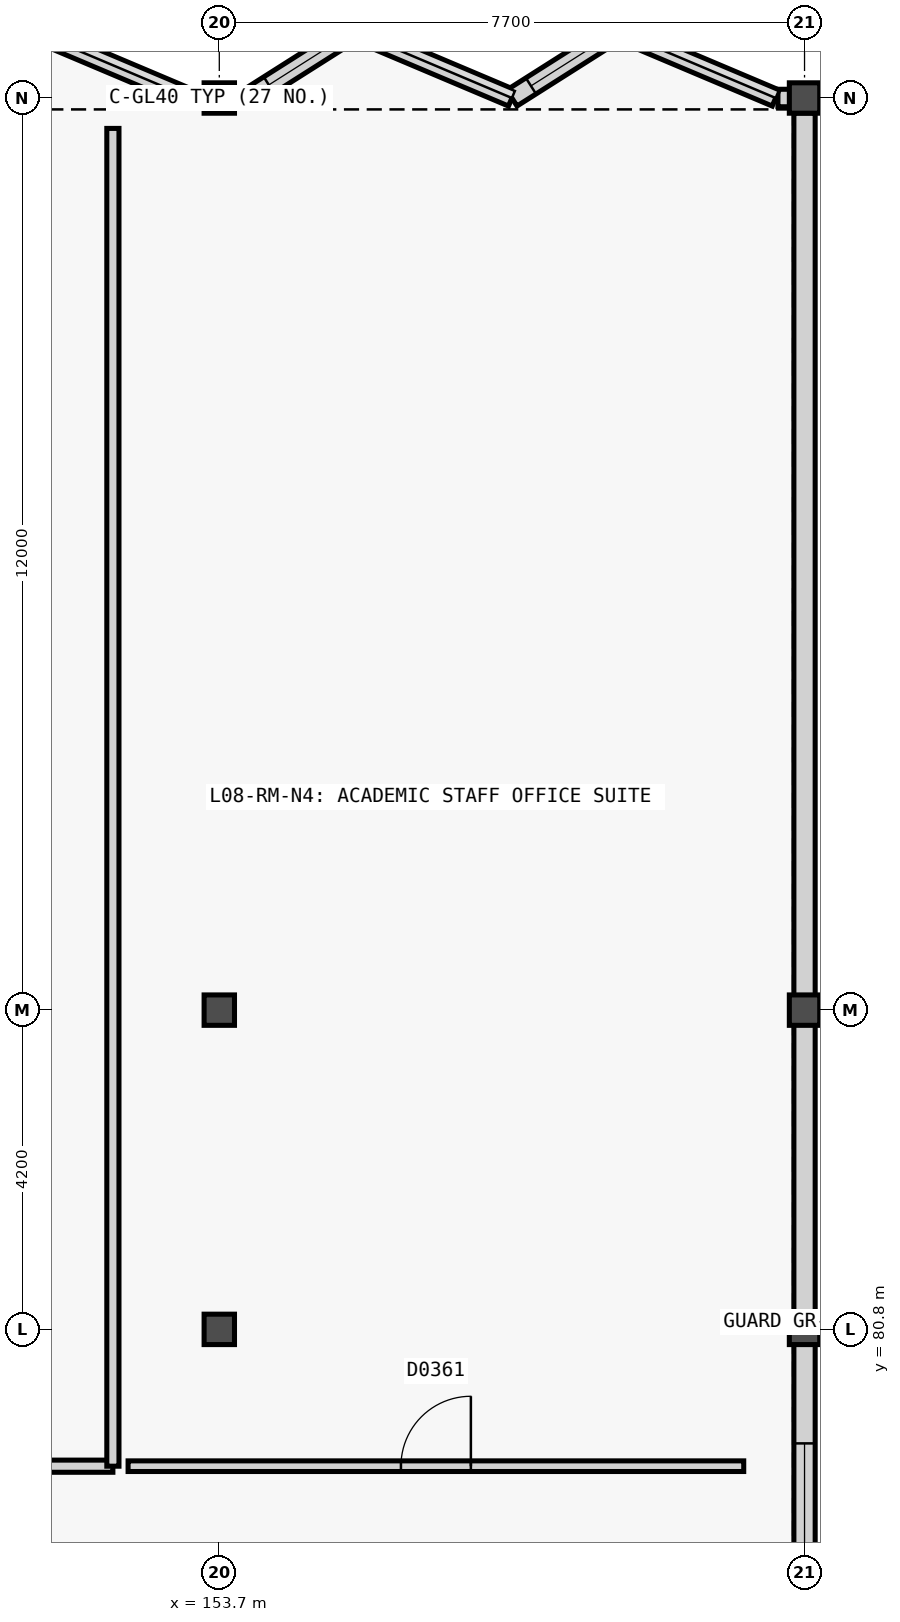
"""IFC4 building model, lengths in metres.
Left out: names, types, materials, properties, quantities, classifications, styles, units other than length and angle.
Written with IfcOpenShell. Run it as: python <this file> out.ifc"""

import sys

from ifc_helpers import new_model, si_unit, direction, frame, frame_2d, origin, origin_2d, place, context, subcontext, project, spatial, rectangle, extrude, element, fill, save


model = new_model("IFC4")
c1 = context("Model", 3, precision=1e-05, world=origin(), true_north=direction((0.0, 1.0)))
c2 = subcontext(c1, "Body", "Model", "MODEL_VIEW")
j1 = project(units=[si_unit("LENGTHUNIT", "METRE"), si_unit("PLANEANGLEUNIT", "RADIAN")], contexts=[c1])
p1 = place(None, origin())
s1 = spatial("IfcSite", under=j1, at=p1, CompositionType="ELEMENT")
p2 = place(p1, origin())
s2 = spatial("IfcBuilding", under=s1, at=p2, CompositionType="ELEMENT")
p3 = place(p2, frame((0.0, 0.0, 32.4)))
s3 = spatial("IfcBuildingStorey", under=s2, at=p3, CompositionType="ELEMENT", Elevation=32.4)
for number, where, z_axis, x_axis in (
    (1, (153.7, 80.8, 0.0), (0.0, 0.0, 1.0), (1.0, 0.0, 0.0)),
    (2, (153.7, 85.0, 0.0), (0.0, 0.0, 1.0), (1.0, 0.0, 0.0)),
    (3, (153.7, 97.0, 0.0), (0.0, 0.0, 1.0), (1.0, 0.0, 0.0)),
    (4, (161.4, 80.8, 0.0), (0.0, 0.0, 1.0), (1.0, 0.0, 0.0)),
    (5, (161.4, 85.0, 0.0), (0.0, 0.0, 1.0), (1.0, 0.0, 0.0)),
    (6, (161.4, 97.0, 0.0), (0.0, 0.0, 1.0), (1.0, 0.0, 0.0)),
):
    element("IfcColumn", number, at=place(p3, frame(where, z_axis=z_axis, x_axis=x_axis)), inside=s3, PredefinedType="COLUMN", context=c2, shape_type="SweptSolid", body=[
        extrude(rectangle(XDim=0.4, YDim=0.4, at=origin_2d()), origin(), (0.0, 0.0, 1.0), 3.6),
    ])
p4 = place(p3, frame((161.4, 96.802, 0.0), z_axis=(0.0, 0.0, 1.0), x_axis=(0.0, -1.0, 0.0)))
e7 = element("IfcWall", 7, at=p4, inside=s3, PredefinedType="SOLIDWALL", context=c2, shape_type="SweptSolid", body=[
    extrude(rectangle(XDim=32.604, YDim=0.28, at=frame_2d((16.302, 0.0))), origin(), (0.0, 0.0, 1.0), 2.8),
])
p5 = place(p4, frame((17.502, 0.0, 0.82)))
e8 = element("IfcOpeningElement", 8, at=p5, cuts=e7, PredefinedType="OPENING", context=c2, shape_type="SweptSolid", body=[
    extrude(rectangle(XDim=4.6, YDim=1.6, at=frame_2d((2.3, 0.8))), frame((0.0, 0.15, 0.0), z_axis=(0.0, -1.0, 0.0), x_axis=(1.0, 0.0, 0.0)), (0.0, 0.0, 1.0), 0.3),
])
p6 = place(p3, frame((153.35, 97.0, 0.0), z_axis=(0.0, 0.0, 1.0), x_axis=(1.0, 0.0, 0.0)))
e9 = element("IfcWall", 9, at=p6, inside=s3, PredefinedType="SOLIDWALL", context=c2, shape_type="SweptSolid", body=[
    extrude(rectangle(XDim=0.35, YDim=0.23, at=frame_2d((0.175, 0.0))), origin(), (0.0, 0.0, 1.0), 3.36),
])
p7 = place(p3, frame((153.7, 97.0, 0.0), z_axis=(0.0, 0.0, 1.0), x_axis=(1.0, 0.0, 0.0)))
e10 = element("IfcWall", 10, at=p7, inside=s3, PredefinedType="SOLIDWALL", context=c2, shape_type="SweptSolid", body=[
    extrude(rectangle(XDim=0.35, YDim=0.23, at=frame_2d((0.175, 0.0))), origin(), (0.0, 0.0, 1.0), 3.36),
])
p8 = place(p3, frame((161.05, 97.0, 0.0), z_axis=(0.0, 0.0, 1.0), x_axis=(1.0, 0.0, 0.0)))
e11 = element("IfcWall", 11, at=p8, inside=s3, PredefinedType="SOLIDWALL", context=c2, shape_type="SweptSolid", body=[
    extrude(rectangle(XDim=0.35, YDim=0.23, at=frame_2d((0.175, 0.0))), origin(), (0.0, 0.0, 1.0), 3.36),
])
p9 = place(p3, frame((151.238, 97.88, 0.0), z_axis=(0.0, 0.0, 1.0), x_axis=(0.921122216024, -0.389273506866, 0.0)))
e12 = element("IfcWall", 12, at=p9, inside=s3, PredefinedType="SOLIDWALL", context=c2, shape_type="SweptSolid", body=[
    extrude(rectangle(XDim=2.26, YDim=0.23, at=frame_2d((1.13, 0.0))), origin(), (0.0, 0.0, 1.0), 3.36),
])
p10 = place(p3, frame((154.08, 97.0, 0.0), z_axis=(0.0, 0.0, 1.0), x_axis=(0.844583954912, 0.535423143976, 0.0)))
e13 = element("IfcWall", 13, at=p10, inside=s3, PredefinedType="SOLIDWALL", context=c2, shape_type="SweptSolid", body=[
    extrude(rectangle(XDim=1.643, YDim=0.25, at=frame_2d((0.822, 0.0))), origin(), (0.0, 0.0, 1.0), 3.36),
])
p11 = place(p10, frame((0.322, 0.0, 0.82)))
e14 = element("IfcOpeningElement", 14, at=p11, cuts=e13, PredefinedType="OPENING", context=c2, shape_type="SweptSolid", body=[
    extrude(rectangle(XDim=1.0, YDim=1.35, at=frame_2d((0.5, 0.675))), frame((0.0, 0.135, 0.0), z_axis=(0.0, -1.0, 0.0), x_axis=(1.0, 0.0, 0.0)), (0.0, 0.0, 1.0), 0.27),
])
p12 = place(p3, frame((155.468, 97.88, 0.0), z_axis=(0.0, 0.0, 1.0), x_axis=(0.921122216024, -0.389273506866, 0.0)))
e15 = element("IfcWall", 15, at=p12, inside=s3, PredefinedType="SOLIDWALL", context=c2, shape_type="SweptSolid", body=[
    extrude(rectangle(XDim=2.26, YDim=0.23, at=frame_2d((1.13, 0.0))), origin(), (0.0, 0.0, 1.0), 3.36),
])
p13 = place(p3, frame((157.55, 97.0, 0.0), z_axis=(0.0, 0.0, 1.0), x_axis=(0.844583954912, 0.535423143976, 0.0)))
e16 = element("IfcWall", 16, at=p13, inside=s3, PredefinedType="SOLIDWALL", context=c2, shape_type="SweptSolid", body=[
    extrude(rectangle(XDim=1.643, YDim=0.25, at=frame_2d((0.822, 0.0))), origin(), (0.0, 0.0, 1.0), 3.36),
])
p14 = place(p13, frame((0.297, 0.0, 0.82)))
e17 = element("IfcOpeningElement", 17, at=p14, cuts=e16, PredefinedType="OPENING", context=c2, shape_type="SweptSolid", body=[
    extrude(rectangle(XDim=1.05, YDim=1.4, at=frame_2d((0.525, 0.7))), frame((0.0, 0.135, 0.0), z_axis=(0.0, -1.0, 0.0), x_axis=(1.0, 0.0, 0.0)), (0.0, 0.0, 1.0), 0.27),
])
p15 = place(p3, frame((158.938, 97.88, 0.0), z_axis=(0.0, 0.0, 1.0), x_axis=(0.921122216024, -0.389273506866, 0.0)))
e18 = element("IfcWall", 18, at=p15, inside=s3, PredefinedType="SOLIDWALL", context=c2, shape_type="SweptSolid", body=[
    extrude(rectangle(XDim=2.26, YDim=0.23, at=frame_2d((1.13, 0.0))), origin(), (0.0, 0.0, 1.0), 3.36),
])
p16 = place(p3, frame((143.0, 79.0, 0.0), z_axis=(0.0, 0.0, 1.0), x_axis=(1.0, 0.0, 0.0)))
e19 = element("IfcWall", 19, at=p16, inside=s3, PredefinedType="PARTITIONING", context=c2, shape_type="SweptSolid", body=[
    extrude(rectangle(XDim=9.3, YDim=0.16, at=frame_2d((4.65, 0.0))), origin(), (0.0, 0.0, 1.0), 3.34),
])
p17 = place(p16, frame((4.125, 0.0, 0.0)))
e20 = element("IfcOpeningElement", 20, at=p17, cuts=e19, PredefinedType="OPENING", context=c2, shape_type="SweptSolid", body=[
    extrude(rectangle(XDim=1.05, YDim=2.15, at=frame_2d((0.525, 1.075))), frame((0.0, 0.09, 0.0), z_axis=(0.0, -1.0, 0.0), x_axis=(1.0, 0.0, 0.0)), (0.0, 0.0, 1.0), 0.18),
])
p18 = place(p3, frame((152.3, 79.0, 0.0), z_axis=(0.0, 0.0, 1.0), x_axis=(0.0, 1.0, 0.0)))
e21 = element("IfcWall", 21, at=p18, inside=s3, PredefinedType="PARTITIONING", context=c2, shape_type="SweptSolid", body=[
    extrude(rectangle(XDim=17.6, YDim=0.16, at=frame_2d((8.8, 0.0))), origin(), (0.0, 0.0, 1.0), 3.34),
])
p19 = place(p3, frame((152.5, 79.0, 0.0), z_axis=(0.0, 0.0, 1.0), x_axis=(1.0, 0.0, 0.0)))
e22 = element("IfcWall", 22, at=p19, inside=s3, PredefinedType="PARTITIONING", context=c2, shape_type="SweptSolid", body=[
    extrude(rectangle(XDim=8.1, YDim=0.14, at=frame_2d((4.05, 0.0))), origin(), (0.0, 0.0, 1.0), 3.34),
])
p20 = place(p19, frame((3.59, 0.0, 0.0)))
e23 = element("IfcOpeningElement", 23, at=p20, cuts=e22, PredefinedType="OPENING", context=c2, shape_type="SweptSolid", body=[
    extrude(rectangle(XDim=0.92, YDim=2.15, at=frame_2d((0.46, 1.075))), frame((0.0, 0.08, 0.0), z_axis=(0.0, -1.0, 0.0), x_axis=(1.0, 0.0, 0.0)), (0.0, 0.0, 1.0), 0.16),
])
p21 = place(p5, origin())
e24 = element("IfcWindow", 24, at=p21, inside=s3, PartitioningType="SINGLE_PANEL", PredefinedType="WINDOW", context=c2, shape_type="SweptSolid", body=[
    extrude(rectangle(XDim=4.6, YDim=1.6, at=frame_2d((2.3, 0.8))), frame((0.0, 0.03, 0.0), z_axis=(0.0, -1.0, 0.0), x_axis=(1.0, 0.0, 0.0)), (0.0, 0.0, 1.0), 0.06),
])
fill(e8, e24)
p22 = place(p11, origin())
e25 = element("IfcWindow", 25, at=p22, inside=s3, PartitioningType="SINGLE_PANEL", PredefinedType="WINDOW", context=c2, shape_type="SweptSolid", body=[
    extrude(rectangle(XDim=1.0, YDim=1.35, at=frame_2d((0.5, 0.675))), frame((0.0, 0.03, 0.0), z_axis=(0.0, -1.0, 0.0), x_axis=(1.0, 0.0, 0.0)), (0.0, 0.0, 1.0), 0.06),
])
fill(e14, e25)
p23 = place(p14, origin())
e26 = element("IfcWindow", 26, at=p23, inside=s3, PartitioningType="SINGLE_PANEL", PredefinedType="WINDOW", context=c2, shape_type="SweptSolid", body=[
    extrude(rectangle(XDim=1.05, YDim=1.4, at=frame_2d((0.525, 0.7))), frame((0.0, 0.03, 0.0), z_axis=(0.0, -1.0, 0.0), x_axis=(1.0, 0.0, 0.0)), (0.0, 0.0, 1.0), 0.06),
])
fill(e17, e26)
p24 = place(p20, origin())
e27 = element("IfcDoor", 27, at=p24, inside=s3, OperationType="SINGLE_SWING_RIGHT", PredefinedType="DOOR", context=c2, shape_type="SweptSolid", body=[
    extrude(rectangle(XDim=0.92, YDim=2.15, at=frame_2d((0.46, 1.075))), frame((0.0, 0.025, 0.0), z_axis=(0.0, -1.0, 0.0), x_axis=(1.0, 0.0, 0.0)), (0.0, 0.0, 1.0), 0.05),
])
fill(e23, e27)
save(model, sys.argv[1])
